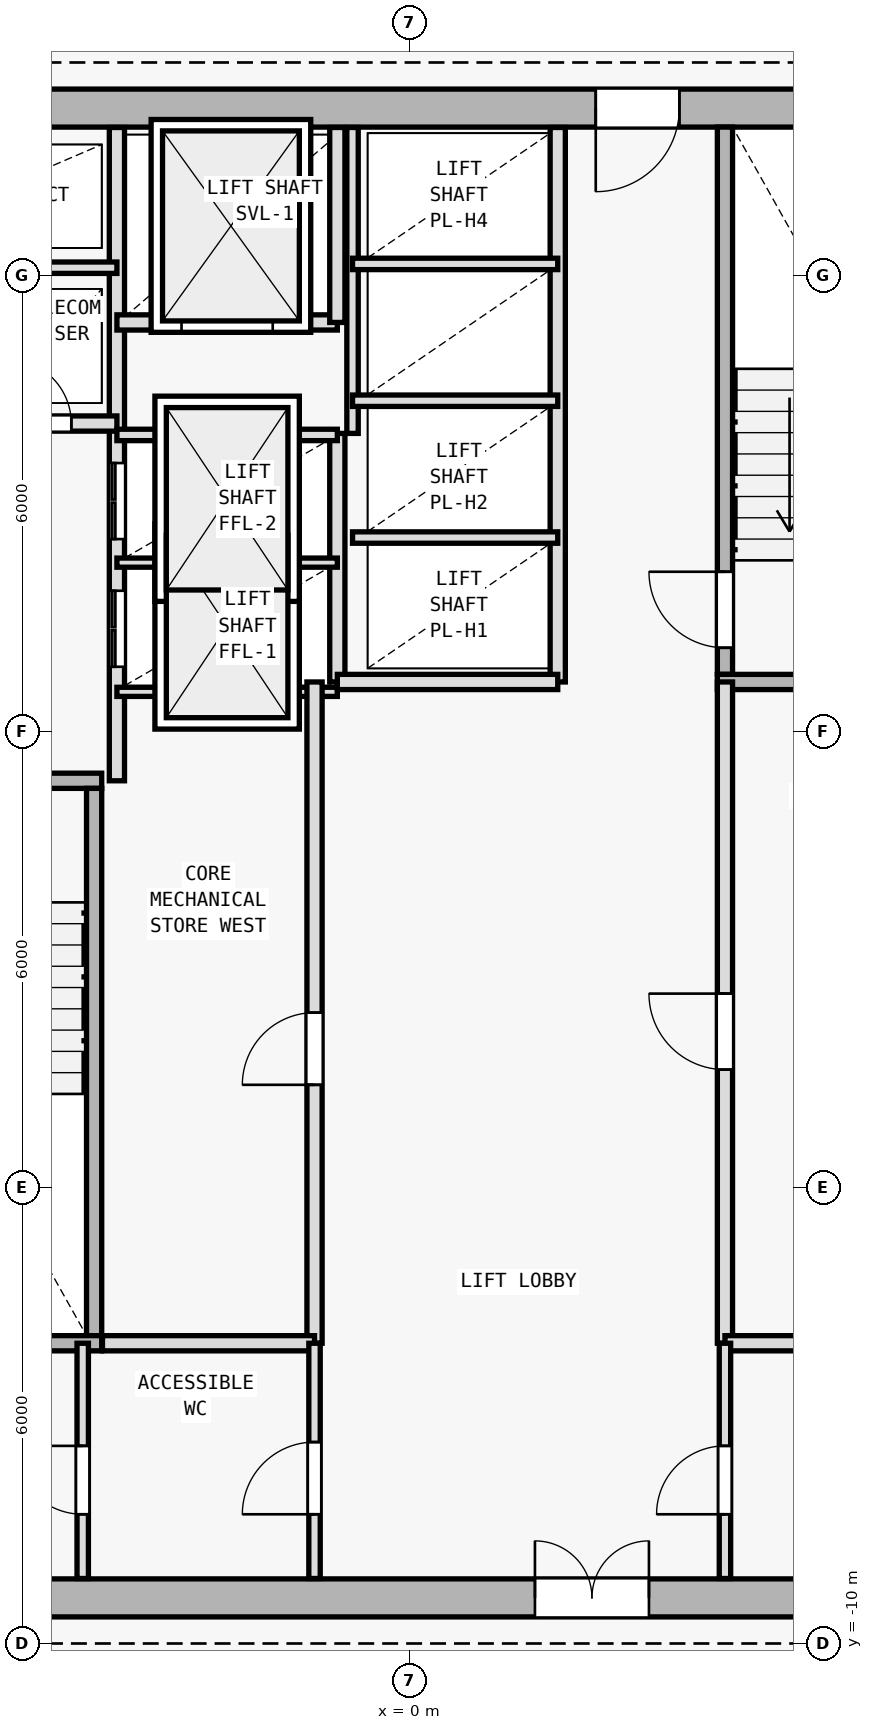
"""IFC4 building model, lengths in metres.
Left out: names, types, materials, properties, quantities, classifications, styles, units other than length and angle.
Written with IfcOpenShell. Run it as: python <this file> out.ifc"""

import sys

from ifc_helpers import new_model, si_unit, direction, frame, frame_2d, origin, origin_2d, place, context, subcontext, project, spatial, rectangle, i_section, extrude, element, fill, save


model = new_model("IFC4")
c1 = context("Model", 3, precision=1e-05, world=origin(), true_north=direction((0.0, 1.0)))
c2 = subcontext(c1, "Body", "Model", "MODEL_VIEW")
j1 = project(units=[si_unit("LENGTHUNIT", "METRE"), si_unit("PLANEANGLEUNIT", "RADIAN")], contexts=[c1])
p1 = place(None, origin())
s1 = spatial("IfcSite", under=j1, at=p1, CompositionType="ELEMENT")
p2 = place(p1, origin())
s2 = spatial("IfcBuilding", under=s1, at=p2, CompositionType="ELEMENT")
p3 = place(p2, frame((0.0, 0.0, 297.6)))
s3 = spatial("IfcBuildingStorey", under=s2, at=p3, CompositionType="ELEMENT", Elevation=297.6)
p4 = place(p3, frame((0.0, -9.4, 0.0), z_axis=(0.0, 0.0, 1.0), x_axis=(1.0, 0.0, 0.0)))
e1 = element("IfcColumn", 1, at=p4, inside=s3, PredefinedType="COLUMN", context=c2, shape_type="SweptSolid", body=[
    extrude(i_section(OverallWidth=0.374, OverallDepth=0.372, WebThickness=0.012, FlangeThickness=0.02, FilletRadius=0.015, at=origin_2d()), origin(), (0.0, 0.0, 1.0), 3.6),
])
p5 = place(p3, frame((-7.95, -9.4, 0.0), z_axis=(0.0, 0.0, 1.0), x_axis=(1.0, 0.0, 0.0)))
e2 = element("IfcWall", 2, at=p5, inside=s3, PredefinedType="SHEAR", context=c2, shape_type="SweptSolid", body=[
    extrude(rectangle(XDim=15.9, YDim=0.5, at=frame_2d((7.95, 0.0))), origin(), (0.0, 0.0, 1.0), 3.34),
])
p6 = place(p5, frame((9.6, 0.0, 0.0)))
e3 = element("IfcOpeningElement", 3, at=p6, cuts=e2, PredefinedType="OPENING", context=c2, shape_type="SweptSolid", body=[
    extrude(rectangle(XDim=1.5, YDim=2.2, at=frame_2d((0.75, 1.1))), frame((0.0, 0.26, 0.0), z_axis=(0.0, -1.0, 0.0), x_axis=(1.0, 0.0, 0.0)), (0.0, 0.0, 1.0), 0.52),
])
p7 = place(p3, frame((7.95, 10.2, 0.0), z_axis=(0.0, 0.0, 1.0), x_axis=(-1.0, 0.0, 0.0)))
e4 = element("IfcWall", 4, at=p7, inside=s3, PredefinedType="SHEAR", context=c2, shape_type="SweptSolid", body=[
    extrude(rectangle(XDim=15.9, YDim=0.5, at=frame_2d((7.95, 0.0))), origin(), (0.0, 0.0, 1.0), 3.34),
])
p8 = place(p7, frame((4.4, 0.0, 0.0)))
e5 = element("IfcOpeningElement", 5, at=p8, cuts=e4, PredefinedType="OPENING", context=c2, shape_type="SweptSolid", body=[
    extrude(rectangle(XDim=1.1, YDim=2.15, at=frame_2d((0.55, 1.075))), frame((0.0, 0.26, 0.0), z_axis=(0.0, -1.0, 0.0), x_axis=(1.0, 0.0, 0.0)), (0.0, 0.0, 1.0), 0.52),
])
p9 = place(p3, frame((-7.45, 1.35, 0.0), z_axis=(0.0, 0.0, 1.0), x_axis=(1.0, 0.0, 0.0)))
e6 = element("IfcWall", 6, at=p9, inside=s3, PredefinedType="SOLIDWALL", context=c2, shape_type="SweptSolid", body=[
    extrude(rectangle(XDim=3.4, YDim=0.2, at=frame_2d((1.7, 0.0))), origin(), (0.0, 0.0, 1.0), 3.34),
])
p10 = place(p9, frame((0.65, 0.0, 0.0)))
e7 = element("IfcOpeningElement", 7, at=p10, cuts=e6, PredefinedType="OPENING", context=c2, shape_type="SweptSolid", body=[
    extrude(rectangle(XDim=1.0, YDim=2.15, at=frame_2d((0.5, 1.075))), frame((0.0, 0.11, 0.0), z_axis=(0.0, -1.0, 0.0), x_axis=(1.0, 0.0, 0.0)), (0.0, 0.0, 1.0), 0.22),
])
p11 = place(p3, frame((-4.15, -5.95, 0.0), z_axis=(0.0, 0.0, 1.0), x_axis=(0.0, 1.0, 0.0)))
e8 = element("IfcWall", 8, at=p11, inside=s3, PredefinedType="SOLIDWALL", context=c2, shape_type="SweptSolid", body=[
    extrude(rectangle(XDim=7.2, YDim=0.2, at=frame_2d((3.6, 0.0))), origin(), (0.0, 0.0, 1.0), 3.34),
])
p12 = place(p3, frame((-3.85, 1.35, 0.0), z_axis=(0.0, 0.0, 1.0), x_axis=(0.0, 1.0, 0.0)))
e9 = element("IfcWall", 9, at=p12, inside=s3, PredefinedType="SOLIDWALL", context=c2, shape_type="SweptSolid", body=[
    extrude(rectangle(XDim=8.595, YDim=0.2, at=frame_2d((4.297, 0.0))), origin(), (0.0, 0.0, 1.0), 3.34),
])
p13 = place(p12, frame((1.5, 0.0, 0.0)))
e10 = element("IfcOpeningElement", 10, at=p13, cuts=e9, PredefinedType="OPENING", context=c2, shape_type="SweptSolid", body=[
    extrude(rectangle(XDim=1.0, YDim=2.15, at=frame_2d((0.5, 1.075))), frame((0.0, 0.11, 0.0), z_axis=(0.0, -1.0, 0.0), x_axis=(1.0, 0.0, 0.0)), (0.0, 0.0, 1.0), 0.22),
])
p14 = place(p12, frame((3.18, 0.0, 0.0)))
e11 = element("IfcOpeningElement", 11, at=p14, cuts=e9, PredefinedType="OPENING", context=c2, shape_type="SweptSolid", body=[
    extrude(rectangle(XDim=1.0, YDim=2.15, at=frame_2d((0.5, 1.075))), frame((0.0, 0.11, 0.0), z_axis=(0.0, -1.0, 0.0), x_axis=(1.0, 0.0, 0.0)), (0.0, 0.0, 1.0), 0.22),
])
p15 = place(p3, frame((-7.445, 6.05, 0.0), z_axis=(0.0, 0.0, 1.0), x_axis=(1.0, 0.0, 0.0)))
e12 = element("IfcWall", 12, at=p15, inside=s3, PredefinedType="SOLIDWALL", context=c2, shape_type="SweptSolid", body=[
    extrude(rectangle(XDim=3.595, YDim=0.2, at=frame_2d((1.797, 0.0))), origin(), (0.0, 0.0, 1.0), 3.34),
])
p16 = place(p15, frame((0.345, 0.0, 0.0)))
e13 = element("IfcOpeningElement", 13, at=p16, cuts=e12, PredefinedType="OPENING", context=c2, shape_type="SweptSolid", body=[
    extrude(rectangle(XDim=0.85, YDim=2.1, at=frame_2d((0.425, 1.05))), frame((0.0, 0.11, 0.0), z_axis=(0.0, -1.0, 0.0), x_axis=(1.0, 0.0, 0.0)), (0.0, 0.0, 1.0), 0.22),
])
p17 = place(p15, frame((2.145, 0.0, 0.0)))
e14 = element("IfcOpeningElement", 14, at=p17, cuts=e12, PredefinedType="OPENING", context=c2, shape_type="SweptSolid", body=[
    extrude(rectangle(XDim=0.85, YDim=2.1, at=frame_2d((0.425, 1.05))), frame((0.0, 0.11, 0.0), z_axis=(0.0, -1.0, 0.0), x_axis=(1.0, 0.0, 0.0)), (0.0, 0.0, 1.0), 0.22),
])
p18 = place(p3, frame((-7.445, 8.1, 0.0), z_axis=(0.0, 0.0, 1.0), x_axis=(1.0, 0.0, 0.0)))
e15 = element("IfcWall", 15, at=p18, inside=s3, PredefinedType="PARTITIONING", context=c2, shape_type="SweptSolid", body=[
    extrude(rectangle(XDim=3.595, YDim=0.15, at=frame_2d((1.797, 0.0))), origin(), (0.0, 0.0, 1.0), 3.34),
])
p19 = place(p3, frame((4.15, 2.75, 0.0), z_axis=(0.0, 0.0, 1.0), x_axis=(0.0, 1.0, 0.0)))
e16 = element("IfcWall", 16, at=p19, inside=s3, PredefinedType="SOLIDWALL", context=c2, shape_type="SweptSolid", body=[
    extrude(rectangle(XDim=7.2, YDim=0.2, at=frame_2d((3.6, 0.0))), origin(), (0.0, 0.0, 1.0), 3.34),
])
p20 = place(p19, frame((0.35, 0.0, 0.0)))
e17 = element("IfcOpeningElement", 17, at=p20, cuts=e16, PredefinedType="OPENING", context=c2, shape_type="SweptSolid", body=[
    extrude(rectangle(XDim=1.0, YDim=2.15, at=frame_2d((0.5, 1.075))), frame((0.0, 0.11, 0.0), z_axis=(0.0, -1.0, 0.0), x_axis=(1.0, 0.0, 0.0)), (0.0, 0.0, 1.0), 0.22),
])
p21 = place(p3, frame((4.05, 2.65, 0.0), z_axis=(0.0, 0.0, 1.0), x_axis=(1.0, 0.0, 0.0)))
e18 = element("IfcWall", 18, at=p21, inside=s3, PredefinedType="SOLIDWALL", context=c2, shape_type="SweptSolid", body=[
    extrude(rectangle(XDim=3.4, YDim=0.2, at=frame_2d((1.7, 0.0))), origin(), (0.0, 0.0, 1.0), 3.34),
])
p22 = place(p3, frame((-0.95, 2.65, 0.0), z_axis=(0.0, 0.0, 1.0), x_axis=(0.0, 1.0, 0.0)))
e19 = element("IfcWall", 19, at=p22, inside=s3, PredefinedType="SOLIDWALL", context=c2, shape_type="SweptSolid", body=[
    extrude(rectangle(XDim=3.27, YDim=0.2, at=frame_2d((1.635, 0.0))), origin(), (0.0, 0.0, 1.0), 3.34),
])
for number, where, z_axis, x_axis in (
    (20, (-3.85, 2.52, 0.0), (0.0, 0.0, 1.0), (1.0, 0.0, 0.0)),
    (21, (-3.85, 4.22, 0.0), (0.0, 0.0, 1.0), (1.0, 0.0, 0.0)),
):
    element("IfcWall", number, at=place(p3, frame(where, z_axis=z_axis, x_axis=x_axis)), inside=s3, PredefinedType="PARTITIONING", context=c2, shape_type="SweptSolid", body=[
        extrude(rectangle(XDim=2.9, YDim=0.12, at=frame_2d((1.45, 0.0))), origin(), (0.0, 0.0, 1.0), 3.34),
    ])
p23 = place(p3, frame((-3.85, 5.9, 0.0), z_axis=(0.0, 0.0, 1.0), x_axis=(1.0, 0.0, 0.0)))
e22 = element("IfcWall", 22, at=p23, inside=s3, PredefinedType="PARTITIONING", context=c2, shape_type="SweptSolid", body=[
    extrude(rectangle(XDim=2.9, YDim=0.15, at=frame_2d((1.45, 0.0))), origin(), (0.0, 0.0, 1.0), 3.34),
])
p24 = place(p3, frame((-3.85, 7.38, 0.0), z_axis=(0.0, 0.0, 1.0), x_axis=(1.0, 0.0, 0.0)))
e23 = element("IfcWall", 23, at=p24, inside=s3, PredefinedType="SOLIDWALL", context=c2, shape_type="SweptSolid", body=[
    extrude(rectangle(XDim=2.9, YDim=0.2, at=frame_2d((1.45, 0.0))), origin(), (0.0, 0.0, 1.0), 3.34),
])
p25 = place(p24, frame((0.85, 0.0, 0.0)))
e24 = element("IfcOpeningElement", 24, at=p25, cuts=e23, PredefinedType="OPENING", context=c2, shape_type="SweptSolid", body=[
    extrude(rectangle(XDim=1.2, YDim=2.2, at=frame_2d((0.6, 1.1))), frame((0.0, 0.11, 0.0), z_axis=(0.0, -1.0, 0.0), x_axis=(1.0, 0.0, 0.0)), (0.0, 0.0, 1.0), 0.22),
])
p26 = place(p3, frame((-0.95, 7.38, 0.0), z_axis=(0.0, 0.0, 1.0), x_axis=(0.0, 1.0, 0.0)))
e25 = element("IfcWall", 25, at=p26, inside=s3, PredefinedType="SOLIDWALL", context=c2, shape_type="SweptSolid", body=[
    extrude(rectangle(XDim=2.565, YDim=0.2, at=frame_2d((1.283, 0.0))), origin(), (0.0, 0.0, 1.0), 3.34),
])
p27 = place(p3, frame((4.15, -6.05, 0.0), z_axis=(0.0, 0.0, 1.0), x_axis=(0.0, 1.0, 0.0)))
e26 = element("IfcWall", 26, at=p27, inside=s3, PredefinedType="SOLIDWALL", context=c2, shape_type="SweptSolid", body=[
    extrude(rectangle(XDim=8.7, YDim=0.2, at=frame_2d((4.35, 0.0))), origin(), (0.0, 0.0, 1.0), 3.34),
])
p28 = place(p27, frame((3.6, 0.0, 0.0)))
e27 = element("IfcOpeningElement", 27, at=p28, cuts=e26, PredefinedType="OPENING", context=c2, shape_type="SweptSolid", body=[
    extrude(rectangle(XDim=1.0, YDim=2.15, at=frame_2d((0.5, 1.075))), frame((0.0, 0.11, 0.0), z_axis=(0.0, -1.0, 0.0), x_axis=(1.0, 0.0, 0.0)), (0.0, 0.0, 1.0), 0.22),
])
p29 = place(p3, frame((-1.25, -6.05, 0.0), z_axis=(0.0, 0.0, 1.0), x_axis=(0.0, 1.0, 0.0)))
e28 = element("IfcWall", 28, at=p29, inside=s3, PredefinedType="SOLIDWALL", context=c2, shape_type="SweptSolid", body=[
    extrude(rectangle(XDim=8.7, YDim=0.2, at=frame_2d((4.35, 0.0))), origin(), (0.0, 0.0, 1.0), 3.34),
])
p30 = place(p29, frame((3.4, 0.0, 0.0)))
e29 = element("IfcOpeningElement", 29, at=p30, cuts=e28, PredefinedType="OPENING", context=c2, shape_type="SweptSolid", body=[
    extrude(rectangle(XDim=0.95, YDim=2.1, at=frame_2d((0.475, 1.05))), frame((0.0, 0.11, 0.0), z_axis=(0.0, -1.0, 0.0), x_axis=(1.0, 0.0, 0.0)), (0.0, 0.0, 1.0), 0.22),
])
p31 = place(p3, frame((1.95, 2.65, 0.0), z_axis=(0.0, 0.0, 1.0), x_axis=(0.0, 1.0, 0.0)))
e30 = element("IfcWall", 30, at=p31, inside=s3, PredefinedType="SOLIDWALL", context=c2, shape_type="SweptSolid", body=[
    extrude(rectangle(XDim=7.295, YDim=0.2, at=frame_2d((3.647, 0.0))), origin(), (0.0, 0.0, 1.0), 3.34),
])
p32 = place(p3, frame((-0.95, 2.65, 0.0), z_axis=(0.0, 0.0, 1.0), x_axis=(1.0, 0.0, 0.0)))
e31 = element("IfcWall", 31, at=p32, inside=s3, PredefinedType="SOLIDWALL", context=c2, shape_type="SweptSolid", body=[
    extrude(rectangle(XDim=2.9, YDim=0.2, at=frame_2d((1.45, 0.0))), origin(), (0.0, 0.0, 1.0), 3.34),
])
p33 = place(p3, frame((-0.75, 5.92, 0.0), z_axis=(0.0, 0.0, 1.0), x_axis=(0.0, 1.0, 0.0)))
e32 = element("IfcWall", 32, at=p33, inside=s3, PredefinedType="PARTITIONING", context=c2, shape_type="SweptSolid", body=[
    extrude(rectangle(XDim=4.025, YDim=0.15, at=frame_2d((2.013, 0.0))), origin(), (0.0, 0.0, 1.0), 3.34),
])
for number, where, z_axis, x_axis in (
    (33, (-0.75, 4.55, 0.0), (0.0, 0.0, 1.0), (1.0, 0.0, 0.0)),
    (34, (-0.75, 6.35, 0.0), (0.0, 0.0, 1.0), (1.0, 0.0, 0.0)),
    (35, (-0.75, 8.15, 0.0), (0.0, 0.0, 1.0), (1.0, 0.0, 0.0)),
):
    element("IfcWall", number, at=place(p3, frame(where, z_axis=z_axis, x_axis=x_axis)), inside=s3, PredefinedType="PARTITIONING", context=c2, shape_type="SweptSolid", body=[
        extrude(rectangle(XDim=2.7, YDim=0.15, at=frame_2d((1.35, 0.0))), origin(), (0.0, 0.0, 1.0), 3.34),
    ])
p34 = place(p3, frame((-7.45, -6.05, 0.0), z_axis=(0.0, 0.0, 1.0), x_axis=(1.0, 0.0, 0.0)))
e36 = element("IfcWall", 36, at=p34, inside=s3, PredefinedType="SOLIDWALL", context=c2, shape_type="SweptSolid", body=[
    extrude(rectangle(XDim=3.4, YDim=0.2, at=frame_2d((1.7, 0.0))), origin(), (0.0, 0.0, 1.0), 3.34),
])
p35 = place(p3, frame((-4.04, -6.05, 0.0), z_axis=(0.0, 0.0, 1.0), x_axis=(1.0, 0.0, 0.0)))
e37 = element("IfcWall", 37, at=p35, inside=s3, PredefinedType="SOLIDWALL", context=c2, shape_type="SweptSolid", body=[
    extrude(rectangle(XDim=2.79, YDim=0.2, at=frame_2d((1.395, 0.0))), origin(), (0.0, 0.0, 1.0), 3.34),
])
p36 = place(p3, frame((4.15, -6.05, 0.0), z_axis=(0.0, 0.0, 1.0), x_axis=(1.0, 0.0, 0.0)))
e38 = element("IfcWall", 38, at=p36, inside=s3, PredefinedType="SOLIDWALL", context=c2, shape_type="SweptSolid", body=[
    extrude(rectangle(XDim=3.295, YDim=0.2, at=frame_2d((1.647, 0.0))), origin(), (0.0, 0.0, 1.0), 3.34),
])
p37 = place(p3, frame((-1.25, -9.145, 0.0), z_axis=(0.0, 0.0, 1.0), x_axis=(0.0, 1.0, 0.0)))
e39 = element("IfcWall", 39, at=p37, inside=s3, PredefinedType="PARTITIONING", context=c2, shape_type="SweptSolid", body=[
    extrude(rectangle(XDim=3.095, YDim=0.15, at=frame_2d((1.547, 0.0))), origin(), (0.0, 0.0, 1.0), 3.34),
])
p38 = place(p37, frame((0.845, 0.0, 0.0)))
e40 = element("IfcOpeningElement", 40, at=p38, cuts=e39, PredefinedType="OPENING", context=c2, shape_type="SweptSolid", body=[
    extrude(rectangle(XDim=0.95, YDim=2.1, at=frame_2d((0.475, 1.05))), frame((0.0, 0.085, 0.0), z_axis=(0.0, -1.0, 0.0), x_axis=(1.0, 0.0, 0.0)), (0.0, 0.0, 1.0), 0.17),
])
p39 = place(p3, frame((4.15, -9.145, 0.0), z_axis=(0.0, 0.0, 1.0), x_axis=(0.0, 1.0, 0.0)))
e41 = element("IfcWall", 41, at=p39, inside=s3, PredefinedType="PARTITIONING", context=c2, shape_type="SweptSolid", body=[
    extrude(rectangle(XDim=3.095, YDim=0.15, at=frame_2d((1.547, 0.0))), origin(), (0.0, 0.0, 1.0), 3.34),
])
p40 = place(p39, frame((0.845, 0.0, 0.0)))
e42 = element("IfcOpeningElement", 42, at=p40, cuts=e41, PredefinedType="OPENING", context=c2, shape_type="SweptSolid", body=[
    extrude(rectangle(XDim=0.9, YDim=2.1, at=frame_2d((0.45, 1.05))), frame((0.0, 0.085, 0.0), z_axis=(0.0, -1.0, 0.0), x_axis=(1.0, 0.0, 0.0)), (0.0, 0.0, 1.0), 0.17),
])
p41 = place(p3, frame((-4.3, -9.145, 0.0), z_axis=(0.0, 0.0, 1.0), x_axis=(0.0, 1.0, 0.0)))
e43 = element("IfcWall", 43, at=p41, inside=s3, PredefinedType="PARTITIONING", context=c2, shape_type="SweptSolid", body=[
    extrude(rectangle(XDim=3.095, YDim=0.15, at=frame_2d((1.547, 0.0))), origin(), (0.0, 0.0, 1.0), 3.34),
])
p42 = place(p41, frame((0.845, 0.0, 0.0)))
e44 = element("IfcOpeningElement", 44, at=p42, cuts=e43, PredefinedType="OPENING", context=c2, shape_type="SweptSolid", body=[
    extrude(rectangle(XDim=0.9, YDim=2.1, at=frame_2d((0.45, 1.05))), frame((0.0, 0.085, 0.0), z_axis=(0.0, -1.0, 0.0), x_axis=(1.0, 0.0, 0.0)), (0.0, 0.0, 1.0), 0.17),
])
p43 = place(p6, origin())
e45 = element("IfcDoor", 45, at=p43, inside=s3, OperationType="DOUBLE_DOOR_SINGLE_SWING", PredefinedType="DOOR", context=c2, shape_type="SweptSolid", body=[
    extrude(rectangle(XDim=1.5, YDim=2.2, at=frame_2d((0.75, 1.1))), frame((0.0, 0.025, 0.0), z_axis=(0.0, -1.0, 0.0), x_axis=(1.0, 0.0, 0.0)), (0.0, 0.0, 1.0), 0.05),
])
fill(e3, e45)
p44 = place(p8, origin())
e46 = element("IfcDoor", 46, at=p44, inside=s3, OperationType="SINGLE_SWING_RIGHT", PredefinedType="DOOR", context=c2, shape_type="SweptSolid", body=[
    extrude(rectangle(XDim=1.1, YDim=2.15, at=frame_2d((0.55, 1.075))), frame((0.0, 0.025, 0.0), z_axis=(0.0, -1.0, 0.0), x_axis=(1.0, 0.0, 0.0)), (0.0, 0.0, 1.0), 0.05),
])
fill(e5, e46)
p45 = place(p17, origin())
e47 = element("IfcDoor", 47, at=p45, inside=s3, OperationType="SINGLE_SWING_LEFT", PredefinedType="DOOR", context=c2, shape_type="SweptSolid", body=[
    extrude(rectangle(XDim=0.85, YDim=2.1, at=frame_2d((0.425, 1.05))), frame((0.0, 0.025, 0.0), z_axis=(0.0, -1.0, 0.0), x_axis=(1.0, 0.0, 0.0)), (0.0, 0.0, 1.0), 0.05),
])
fill(e14, e47)
p46 = place(p20, origin())
e48 = element("IfcDoor", 48, at=p46, inside=s3, OperationType="SINGLE_SWING_RIGHT", PredefinedType="DOOR", context=c2, shape_type="SweptSolid", body=[
    extrude(rectangle(XDim=1.0, YDim=2.15, at=frame_2d((0.5, 1.075))), frame((0.0, 0.025, 0.0), z_axis=(0.0, -1.0, 0.0), x_axis=(1.0, 0.0, 0.0)), (0.0, 0.0, 1.0), 0.05),
])
fill(e17, e48)
p47 = place(p25, origin())
e49 = element("IfcDoor", 49, at=p47, inside=s3, OperationType="DOUBLE_DOOR_SLIDING", PredefinedType="DOOR", context=c2, shape_type="SweptSolid", body=[
    extrude(rectangle(XDim=1.2, YDim=2.2, at=frame_2d((0.6, 1.1))), frame((0.0, 0.025, 0.0), z_axis=(0.0, -1.0, 0.0), x_axis=(1.0, 0.0, 0.0)), (0.0, 0.0, 1.0), 0.05),
])
fill(e24, e49)
p48 = place(p28, origin())
e50 = element("IfcDoor", 50, at=p48, inside=s3, OperationType="SINGLE_SWING_RIGHT", PredefinedType="DOOR", context=c2, shape_type="SweptSolid", body=[
    extrude(rectangle(XDim=1.0, YDim=2.15, at=frame_2d((0.5, 1.075))), frame((0.0, 0.025, 0.0), z_axis=(0.0, -1.0, 0.0), x_axis=(1.0, 0.0, 0.0)), (0.0, 0.0, 1.0), 0.05),
])
fill(e27, e50)
p49 = place(p30, origin())
e51 = element("IfcDoor", 51, at=p49, inside=s3, OperationType="SINGLE_SWING_LEFT", PredefinedType="DOOR", context=c2, shape_type="SweptSolid", body=[
    extrude(rectangle(XDim=0.95, YDim=2.1, at=frame_2d((0.475, 1.05))), frame((0.0, 0.025, 0.0), z_axis=(0.0, -1.0, 0.0), x_axis=(1.0, 0.0, 0.0)), (0.0, 0.0, 1.0), 0.05),
])
fill(e29, e51)
p50 = place(p13, origin())
e52 = element("IfcDoor", 52, at=p50, inside=s3, OperationType="DOUBLE_DOOR_SLIDING", PredefinedType="DOOR", context=c2, shape_type="SweptSolid", body=[
    extrude(rectangle(XDim=1.0, YDim=2.15, at=frame_2d((0.5, 1.075))), frame((0.0, 0.025, 0.0), z_axis=(0.0, -1.0, 0.0), x_axis=(1.0, 0.0, 0.0)), (0.0, 0.0, 1.0), 0.05),
])
fill(e10, e52)
p51 = place(p14, origin())
e53 = element("IfcDoor", 53, at=p51, inside=s3, OperationType="DOUBLE_DOOR_SLIDING", PredefinedType="DOOR", context=c2, shape_type="SweptSolid", body=[
    extrude(rectangle(XDim=1.0, YDim=2.15, at=frame_2d((0.5, 1.075))), frame((0.0, 0.025, 0.0), z_axis=(0.0, -1.0, 0.0), x_axis=(1.0, 0.0, 0.0)), (0.0, 0.0, 1.0), 0.05),
])
fill(e11, e53)
p52 = place(p38, origin())
e54 = element("IfcDoor", 54, at=p52, inside=s3, OperationType="SINGLE_SWING_LEFT", PredefinedType="DOOR", context=c2, shape_type="SweptSolid", body=[
    extrude(rectangle(XDim=0.95, YDim=2.1, at=frame_2d((0.475, 1.05))), frame((0.0, 0.025, 0.0), z_axis=(0.0, -1.0, 0.0), x_axis=(1.0, 0.0, 0.0)), (0.0, 0.0, 1.0), 0.05),
])
fill(e40, e54)
p53 = place(p42, origin())
e55 = element("IfcDoor", 55, at=p53, inside=s3, OperationType="SINGLE_SWING_RIGHT", PredefinedType="DOOR", context=c2, shape_type="SweptSolid", body=[
    extrude(rectangle(XDim=0.9, YDim=2.1, at=frame_2d((0.45, 1.05))), frame((0.0, 0.025, 0.0), z_axis=(0.0, -1.0, 0.0), x_axis=(1.0, 0.0, 0.0)), (0.0, 0.0, 1.0), 0.05),
])
fill(e44, e55)
p54 = place(p40, origin())
e56 = element("IfcDoor", 56, at=p54, inside=s3, OperationType="SINGLE_SWING_LEFT", PredefinedType="DOOR", context=c2, shape_type="SweptSolid", body=[
    extrude(rectangle(XDim=0.9, YDim=2.1, at=frame_2d((0.45, 1.05))), frame((0.0, 0.025, 0.0), z_axis=(0.0, -1.0, 0.0), x_axis=(1.0, 0.0, 0.0)), (0.0, 0.0, 1.0), 0.05),
])
fill(e42, e56)
save(model, sys.argv[1])
